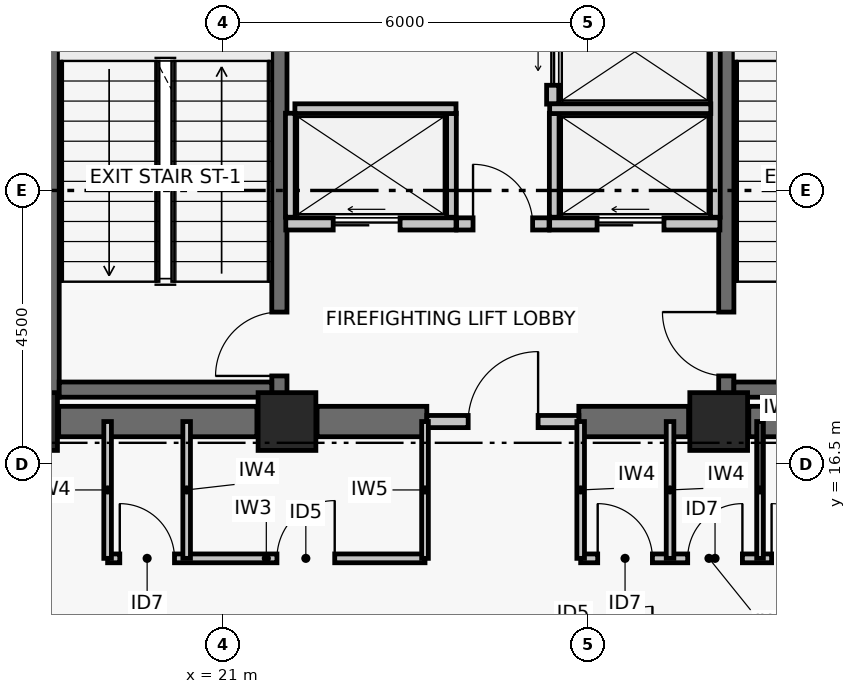
"""IFC4 building model, lengths in metres.
Left out: names, types, materials, properties, quantities, classifications, styles, units other than length and angle.
Written with IfcOpenShell. Run it as: python <this file> out.ifc"""

import sys

from ifc_helpers import new_model, si_unit, direction, frame, frame_2d, origin, origin_2d, place, context, subcontext, project, spatial, rectangle, extrude, element, fill, save


model = new_model("IFC4")
c1 = context("Model", 3, precision=1e-05, world=origin(), true_north=direction((0.0, 1.0)))
c2 = subcontext(c1, "Body", "Model", "MODEL_VIEW")
j1 = project(units=[si_unit("LENGTHUNIT", "METRE"), si_unit("PLANEANGLEUNIT", "RADIAN")], contexts=[c1])
p1 = place(None, origin())
s1 = spatial("IfcSite", under=j1, at=p1, CompositionType="ELEMENT")
p2 = place(p1, origin())
s2 = spatial("IfcBuilding", under=s1, at=p2, CompositionType="ELEMENT")
p3 = place(p2, frame((0.0, 0.0, 219.54)))
s3 = spatial("IfcBuildingStorey", under=s2, at=p3, CompositionType="ELEMENT", Elevation=219.54)
for number, where, z_axis, x_axis in (
    (1, (17.8, 17.2, 0.0), (0.0, 0.0, 1.0), (1.0, 0.0, 0.0)),
    (2, (22.05, 17.2, 0.0), (0.0, 0.0, 1.0), (1.0, 0.0, 0.0)),
    (3, (29.15, 17.2, 0.0), (0.0, 0.0, 1.0), (1.0, 0.0, 0.0)),
):
    element("IfcColumn", number, at=place(p3, frame(where, z_axis=z_axis, x_axis=x_axis)), inside=s3, PredefinedType="COLUMN", context=c2, shape_type="SweptSolid", body=[
        extrude(rectangle(XDim=0.95, YDim=0.95, at=origin_2d()), origin(), (0.0, 0.0, 1.0), 3.72),
    ])
p4 = place(p3, frame((18.295, 17.2, 0.0), z_axis=(0.0, 0.0, 1.0), x_axis=(1.0, 0.0, 0.0)))
e4 = element("IfcWall", 4, at=p4, inside=s3, PredefinedType="SHEAR", context=c2, shape_type="SweptSolid", body=[
    extrude(rectangle(XDim=3.26, YDim=0.5, at=frame_2d((1.63, 0.0))), origin(), (0.0, 0.0, 1.0), 3.5),
])
p5 = place(p3, frame((22.545, 17.2, 0.0), z_axis=(0.0, 0.0, 1.0), x_axis=(1.0, 0.0, 0.0)))
e5 = element("IfcWall", 5, at=p5, inside=s3, PredefinedType="SHEAR", context=c2, shape_type="SweptSolid", body=[
    extrude(rectangle(XDim=1.805, YDim=0.5, at=frame_2d((0.903, 0.0))), origin(), (0.0, 0.0, 1.0), 3.5),
])
p6 = place(p3, frame((26.85, 17.2, 0.0), z_axis=(0.0, 0.0, 1.0), x_axis=(1.0, 0.0, 0.0)))
e6 = element("IfcWall", 6, at=p6, inside=s3, PredefinedType="SHEAR", context=c2, shape_type="SweptSolid", body=[
    extrude(rectangle(XDim=1.805, YDim=0.5, at=frame_2d((0.902, 0.0))), origin(), (0.0, 0.0, 1.0), 3.5),
])
p7 = place(p3, frame((29.645, 17.2, 0.0), z_axis=(0.0, 0.0, 1.0), x_axis=(1.0, 0.0, 0.0)))
e7 = element("IfcWall", 7, at=p7, inside=s3, PredefinedType="SHEAR", context=c2, shape_type="SweptSolid", body=[
    extrude(rectangle(XDim=3.26, YDim=0.5, at=frame_2d((1.63, 0.0))), origin(), (0.0, 0.0, 1.0), 3.5),
])
p8 = place(p3, frame((18.179, 17.6, 0.0), z_axis=(0.0, 0.0, 1.0), x_axis=(0.0, 1.0, 0.0)))
e8 = element("IfcWall", 8, at=p8, inside=s3, PredefinedType="SHEAR", context=c2, shape_type="SweptSolid", body=[
    extrude(rectangle(XDim=8.8, YDim=0.25, at=frame_2d((4.4, 0.0))), origin(), (0.0, 0.0, 1.0), 3.5),
])
p9 = place(p3, frame((21.925, 17.6, 0.0), z_axis=(0.0, 0.0, 1.0), x_axis=(0.0, 1.0, 0.0)))
e9 = element("IfcWall", 9, at=p9, inside=s3, PredefinedType="SHEAR", context=c2, shape_type="SweptSolid", body=[
    extrude(rectangle(XDim=8.8, YDim=0.25, at=frame_2d((4.4, 0.0))), origin(), (0.0, 0.0, 1.0), 3.5),
])
p10 = place(p9, frame((0.35, 0.0, 0.0)))
e10 = element("IfcOpeningElement", 10, at=p10, cuts=e9, PredefinedType="OPENING", context=c2, shape_type="SweptSolid", body=[
    extrude(rectangle(XDim=1.05, YDim=2.08, at=frame_2d((0.525, 1.04))), frame((0.0, 0.135, 0.0), z_axis=(0.0, -1.0, 0.0), x_axis=(1.0, 0.0, 0.0)), (0.0, 0.0, 1.0), 0.27),
])
p11 = place(p3, frame((18.304, 17.725, 0.0), z_axis=(0.0, 0.0, 1.0), x_axis=(1.0, 0.0, 0.0)))
e11 = element("IfcWall", 11, at=p11, inside=s3, PredefinedType="SHEAR", context=c2, shape_type="SweptSolid", body=[
    extrude(rectangle(XDim=3.496, YDim=0.25, at=frame_2d((1.748, 0.0))), origin(), (0.0, 0.0, 1.0), 3.5),
])
p12 = place(p3, frame((29.275, 17.6, 0.0), z_axis=(0.0, 0.0, 1.0), x_axis=(0.0, 1.0, 0.0)))
e12 = element("IfcWall", 12, at=p12, inside=s3, PredefinedType="SHEAR", context=c2, shape_type="SweptSolid", body=[
    extrude(rectangle(XDim=8.8, YDim=0.25, at=frame_2d((4.4, 0.0))), origin(), (0.0, 0.0, 1.0), 3.5),
])
p13 = place(p12, frame((0.35, 0.0, 0.0)))
e13 = element("IfcOpeningElement", 13, at=p13, cuts=e12, PredefinedType="OPENING", context=c2, shape_type="SweptSolid", body=[
    extrude(rectangle(XDim=1.05, YDim=2.08, at=frame_2d((0.525, 1.04))), frame((0.0, 0.135, 0.0), z_axis=(0.0, -1.0, 0.0), x_axis=(1.0, 0.0, 0.0)), (0.0, 0.0, 1.0), 0.27),
])
p14 = place(p3, frame((29.4, 17.725, 0.0), z_axis=(0.0, 0.0, 1.0), x_axis=(1.0, 0.0, 0.0)))
e14 = element("IfcWall", 14, at=p14, inside=s3, PredefinedType="SHEAR", context=c2, shape_type="SweptSolid", body=[
    extrude(rectangle(XDim=3.496, YDim=0.25, at=frame_2d((1.748, 0.0))), origin(), (0.0, 0.0, 1.0), 3.5),
])
p15 = place(p3, frame((24.35, 17.2, 0.0), z_axis=(0.0, 0.0, 1.0), x_axis=(1.0, 0.0, 0.0)))
e15 = element("IfcWall", 15, at=p15, inside=s3, PredefinedType="PARTITIONING", context=c2, shape_type="SweptSolid", body=[
    extrude(rectangle(XDim=2.5, YDim=0.2, at=frame_2d((1.25, 0.0))), origin(), (0.0, 0.0, 1.0), 2.63),
])
p16 = place(p15, frame((0.68, 0.0, 0.0)))
e16 = element("IfcOpeningElement", 16, at=p16, cuts=e15, PredefinedType="OPENING", context=c2, shape_type="SweptSolid", body=[
    extrude(rectangle(XDim=1.15, YDim=2.08, at=frame_2d((0.575, 1.04))), frame((0.0, 0.11, 0.0), z_axis=(0.0, -1.0, 0.0), x_axis=(1.0, 0.0, 0.0)), (0.0, 0.0, 1.0), 0.22),
])
p17 = place(p3, frame((24.84, 20.45, 0.0), z_axis=(0.0, 0.0, 1.0), x_axis=(1.0, 0.0, 0.0)))
e17 = element("IfcWall", 17, at=p17, inside=s3, PredefinedType="PARTITIONING", context=c2, shape_type="SweptSolid", body=[
    extrude(rectangle(XDim=1.52, YDim=0.2, at=frame_2d((0.76, 0.0))), origin(), (0.0, 0.0, 1.0), 3.5),
])
p18 = place(p17, frame((0.27, 0.0, 0.0)))
e18 = element("IfcOpeningElement", 18, at=p18, cuts=e17, PredefinedType="OPENING", context=c2, shape_type="SweptSolid", body=[
    extrude(rectangle(XDim=0.98, YDim=2.06, at=frame_2d((0.49, 1.03))), frame((0.0, 0.11, 0.0), z_axis=(0.0, -1.0, 0.0), x_axis=(1.0, 0.0, 0.0)), (0.0, 0.0, 1.0), 0.22),
])
p19 = place(p3, frame((22.03, 20.45, 0.0), z_axis=(0.0, 0.0, 1.0), x_axis=(1.0, 0.0, 0.0)))
e19 = element("IfcWall", 19, at=p19, inside=s3, PredefinedType="PARTITIONING", context=c2, shape_type="SweptSolid", body=[
    extrude(rectangle(XDim=2.8, YDim=0.2, at=frame_2d((1.4, 0.0))), origin(), (0.0, 0.0, 1.0), 3.5),
])
p20 = place(p19, frame((0.78, 0.0, 0.0)))
e20 = element("IfcOpeningElement", 20, at=p20, cuts=e19, PredefinedType="OPENING", context=c2, shape_type="SweptSolid", body=[
    extrude(rectangle(XDim=1.1, YDim=2.08, at=frame_2d((0.55, 1.04))), frame((0.0, 0.11, 0.0), z_axis=(0.0, -1.0, 0.0), x_axis=(1.0, 0.0, 0.0)), (0.0, 0.0, 1.0), 0.22),
])
p21 = place(p3, frame((26.37, 20.45, 0.0), z_axis=(0.0, 0.0, 1.0), x_axis=(1.0, 0.0, 0.0)))
e21 = element("IfcWall", 21, at=p21, inside=s3, PredefinedType="PARTITIONING", context=c2, shape_type="SweptSolid", body=[
    extrude(rectangle(XDim=2.8, YDim=0.2, at=frame_2d((1.4, 0.0))), origin(), (0.0, 0.0, 1.0), 3.5),
])
p22 = place(p21, frame((0.78, 0.0, 0.0)))
e22 = element("IfcOpeningElement", 22, at=p22, cuts=e21, PredefinedType="OPENING", context=c2, shape_type="SweptSolid", body=[
    extrude(rectangle(XDim=1.1, YDim=2.08, at=frame_2d((0.55, 1.04))), frame((0.0, 0.11, 0.0), z_axis=(0.0, -1.0, 0.0), x_axis=(1.0, 0.0, 0.0)), (0.0, 0.0, 1.0), 0.22),
])
p23 = place(p3, frame((26.42, 22.42, 0.0), z_axis=(0.0, 0.0, 1.0), x_axis=(0.0, 1.0, 0.0)))
e23 = element("IfcWall", 23, at=p23, inside=s3, PredefinedType="PARTITIONING", context=c2, shape_type="SweptSolid", body=[
    extrude(rectangle(XDim=1.72, YDim=0.2, at=frame_2d((0.86, 0.0))), origin(), (0.0, 0.0, 1.0), 3.5),
])
p24 = place(p23, frame((0.31, 0.0, 0.0)))
e24 = element("IfcOpeningElement", 24, at=p24, cuts=e23, PredefinedType="OPENING", context=c2, shape_type="SweptSolid", body=[
    extrude(rectangle(XDim=1.1, YDim=2.08, at=frame_2d((0.55, 1.04))), frame((0.0, 0.11, 0.0), z_axis=(0.0, -1.0, 0.0), x_axis=(1.0, 0.0, 0.0)), (0.0, 0.0, 1.0), 0.22),
])
for number, where, z_axis, x_axis in (
    (25, (22.105, 20.56, 0.0), (0.0, 0.0, 1.0), (0.0, 1.0, 0.0)),
    (26, (24.755, 20.56, 0.0), (0.0, 0.0, 1.0), (0.0, 1.0, 0.0)),
):
    element("IfcWall", number, at=place(p3, frame(where, z_axis=z_axis, x_axis=x_axis)), inside=s3, PredefinedType="PARTITIONING", context=c2, shape_type="SweptSolid", body=[
        extrude(rectangle(XDim=1.71, YDim=0.16, at=frame_2d((0.855, 0.0))), origin(), (0.0, 0.0, 1.0), 3.5),
    ])
p25 = place(p3, frame((22.18, 22.345, 0.0), z_axis=(0.0, 0.0, 1.0), x_axis=(1.0, 0.0, 0.0)))
e27 = element("IfcWall", 27, at=p25, inside=s3, PredefinedType="PARTITIONING", context=c2, shape_type="SweptSolid", body=[
    extrude(rectangle(XDim=2.65, YDim=0.16, at=frame_2d((1.325, 0.0))), origin(), (0.0, 0.0, 1.0), 3.5),
])
p26 = place(p3, frame((29.095, 20.56, 0.0), z_axis=(0.0, 0.0, 1.0), x_axis=(0.0, 1.0, 0.0)))
e28 = element("IfcWall", 28, at=p26, inside=s3, PredefinedType="PARTITIONING", context=c2, shape_type="SweptSolid", body=[
    extrude(rectangle(XDim=3.58, YDim=0.16, at=frame_2d((1.79, 0.0))), origin(), (0.0, 0.0, 1.0), 3.5),
])
p27 = place(p3, frame((26.445, 20.56, 0.0), z_axis=(0.0, 0.0, 1.0), x_axis=(0.0, 1.0, 0.0)))
e29 = element("IfcWall", 29, at=p27, inside=s3, PredefinedType="PARTITIONING", context=c2, shape_type="SweptSolid", body=[
    extrude(rectangle(XDim=1.71, YDim=0.16, at=frame_2d((0.855, 0.0))), origin(), (0.0, 0.0, 1.0), 3.5),
])
p28 = place(p3, frame((26.37, 22.345, 0.0), z_axis=(0.0, 0.0, 1.0), x_axis=(1.0, 0.0, 0.0)))
e30 = element("IfcWall", 30, at=p28, inside=s3, PredefinedType="PARTITIONING", context=c2, shape_type="SweptSolid", body=[
    extrude(rectangle(XDim=2.65, YDim=0.16, at=frame_2d((1.325, 0.0))), origin(), (0.0, 0.0, 1.0), 3.5),
])
p29 = place(p3, frame((19.1, 14.95, 0.0), z_axis=(0.0, 0.0, 1.0), x_axis=(1.0, 0.0, 0.0)))
e31 = element("IfcWall", 31, at=p29, inside=s3, PredefinedType="PARTITIONING", context=c2, shape_type="SweptSolid", body=[
    extrude(rectangle(XDim=5.22, YDim=0.145, at=frame_2d((2.61, 0.0))), origin(), (0.0, 0.0, 1.0), 2.78),
])
p30 = place(p29, frame((0.2, 0.0, 0.0)))
e32 = element("IfcOpeningElement", 32, at=p30, cuts=e31, PredefinedType="OPENING", context=c2, shape_type="SweptSolid", body=[
    extrude(rectangle(XDim=0.9, YDim=2.02, at=frame_2d((0.45, 1.01))), frame((0.0, 0.083, 0.0), z_axis=(0.0, -1.0, 0.0), x_axis=(1.0, 0.0, 0.0)), (0.0, 0.0, 1.0), 0.165),
])
p31 = place(p29, frame((2.785, 0.0, 0.0)))
e33 = element("IfcOpeningElement", 33, at=p31, cuts=e31, PredefinedType="OPENING", context=c2, shape_type="SweptSolid", body=[
    extrude(rectangle(XDim=0.95, YDim=2.06, at=frame_2d((0.475, 1.03))), frame((0.0, 0.083, 0.0), z_axis=(0.0, -1.0, 0.0), x_axis=(1.0, 0.0, 0.0)), (0.0, 0.0, 1.0), 0.165),
])
p32 = place(p3, frame((26.88, 14.95, 0.0), z_axis=(0.0, 0.0, 1.0), x_axis=(1.0, 0.0, 0.0)))
e34 = element("IfcWall", 34, at=p32, inside=s3, PredefinedType="PARTITIONING", context=c2, shape_type="SweptSolid", body=[
    extrude(rectangle(XDim=4.22, YDim=0.145, at=frame_2d((2.11, 0.0))), origin(), (0.0, 0.0, 1.0), 2.98),
])
p33 = place(p32, frame((0.28, 0.0, 0.0)))
e35 = element("IfcOpeningElement", 35, at=p33, cuts=e34, PredefinedType="OPENING", context=c2, shape_type="SweptSolid", body=[
    extrude(rectangle(XDim=0.9, YDim=2.02, at=frame_2d((0.45, 1.01))), frame((0.0, 0.083, 0.0), z_axis=(0.0, -1.0, 0.0), x_axis=(1.0, 0.0, 0.0)), (0.0, 0.0, 1.0), 0.165),
])
p34 = place(p32, frame((1.76, 0.0, 0.0)))
e36 = element("IfcOpeningElement", 36, at=p34, cuts=e34, PredefinedType="OPENING", context=c2, shape_type="SweptSolid", body=[
    extrude(rectangle(XDim=0.9, YDim=2.02, at=frame_2d((0.45, 1.01))), frame((0.0, 0.083, 0.0), z_axis=(0.0, -1.0, 0.0), x_axis=(1.0, 0.0, 0.0)), (0.0, 0.0, 1.0), 0.165),
])
p35 = place(p32, frame((3.14, 0.0, 0.0)))
e37 = element("IfcOpeningElement", 37, at=p35, cuts=e34, PredefinedType="OPENING", context=c2, shape_type="SweptSolid", body=[
    extrude(rectangle(XDim=0.9, YDim=2.02, at=frame_2d((0.45, 1.01))), frame((0.0, 0.083, 0.0), z_axis=(0.0, -1.0, 0.0), x_axis=(1.0, 0.0, 0.0)), (0.0, 0.0, 1.0), 0.165),
])
for number, where, z_axis, x_axis in (
    (38, (19.1, 14.95, 0.0), (0.0, 0.0, 1.0), (0.0, 1.0, 0.0)),
    (39, (20.4, 14.95, 0.0), (0.0, 0.0, 1.0), (0.0, 1.0, 0.0)),
):
    element("IfcWall", number, at=place(p3, frame(where, z_axis=z_axis, x_axis=x_axis)), inside=s3, PredefinedType="PARTITIONING", context=c2, shape_type="SweptSolid", body=[
        extrude(rectangle(XDim=2.25, YDim=0.125, at=frame_2d((1.125, 0.0))), origin(), (0.0, 0.0, 1.0), 2.63),
    ])
p36 = place(p3, frame((24.32, 14.95, 0.0), z_axis=(0.0, 0.0, 1.0), x_axis=(0.0, 1.0, 0.0)))
e40 = element("IfcWall", 40, at=p36, inside=s3, PredefinedType="PARTITIONING", context=c2, shape_type="SweptSolid", body=[
    extrude(rectangle(XDim=2.25, YDim=0.11, at=frame_2d((1.125, 0.0))), origin(), (0.0, 0.0, 1.0), 2.63),
])
for number, where, z_axis, x_axis in (
    (41, (26.88, 14.95, 0.0), (0.0, 0.0, 1.0), (0.0, 1.0, 0.0)),
    (42, (28.35, 14.95, 0.0), (0.0, 0.0, 1.0), (0.0, 1.0, 0.0)),
):
    element("IfcWall", number, at=place(p3, frame(where, z_axis=z_axis, x_axis=x_axis)), inside=s3, PredefinedType="PARTITIONING", context=c2, shape_type="SweptSolid", body=[
        extrude(rectangle(XDim=2.25, YDim=0.125, at=frame_2d((1.125, 0.0))), origin(), (0.0, 0.0, 1.0), 2.63),
    ])
p37 = place(p3, frame((29.83, 14.95, 0.0), z_axis=(0.0, 0.0, 1.0), x_axis=(0.0, 1.0, 0.0)))
e43 = element("IfcWall", 43, at=p37, inside=s3, PredefinedType="PARTITIONING", context=c2, shape_type="SweptSolid", body=[
    extrude(rectangle(XDim=2.25, YDim=0.11, at=frame_2d((1.125, 0.0))), origin(), (0.0, 0.0, 1.0), 2.63),
])
p38 = place(p3, frame((29.709, 13.222, 0.0), z_axis=(0.0, 0.0, 1.0), x_axis=(0.854635840942, 0.519227868451, 0.0)))
e44 = element("IfcWall", 44, at=p38, inside=s3, PredefinedType="PARTITIONING", context=c2, shape_type="SweptSolid", body=[
    extrude(rectangle(XDim=1.735, YDim=0.145, at=frame_2d((0.867, 0.0))), origin(), (0.0, 0.0, 1.0), 3.5),
])
p39 = place(p10, origin())
e45 = element("IfcDoor", 45, at=p39, inside=s3, OperationType="SINGLE_SWING_LEFT", PredefinedType="DOOR", context=c2, shape_type="SweptSolid", body=[
    extrude(rectangle(XDim=1.05, YDim=2.08, at=frame_2d((0.525, 1.04))), frame((0.0, 0.025, 0.0), z_axis=(0.0, -1.0, 0.0), x_axis=(1.0, 0.0, 0.0)), (0.0, 0.0, 1.0), 0.05),
])
fill(e10, e45)
p40 = place(p13, origin())
e46 = element("IfcDoor", 46, at=p40, inside=s3, OperationType="SINGLE_SWING_RIGHT", PredefinedType="DOOR", context=c2, shape_type="SweptSolid", body=[
    extrude(rectangle(XDim=1.05, YDim=2.08, at=frame_2d((0.525, 1.04))), frame((0.0, 0.025, 0.0), z_axis=(0.0, -1.0, 0.0), x_axis=(1.0, 0.0, 0.0)), (0.0, 0.0, 1.0), 0.05),
])
fill(e13, e46)
p41 = place(p16, origin())
e47 = element("IfcDoor", 47, at=p41, inside=s3, OperationType="SINGLE_SWING_RIGHT", PredefinedType="DOOR", context=c2, shape_type="SweptSolid", body=[
    extrude(rectangle(XDim=1.15, YDim=2.08, at=frame_2d((0.575, 1.04))), frame((0.0, 0.025, 0.0), z_axis=(0.0, -1.0, 0.0), x_axis=(1.0, 0.0, 0.0)), (0.0, 0.0, 1.0), 0.05),
])
fill(e16, e47)
p42 = place(p18, origin())
e48 = element("IfcDoor", 48, at=p42, inside=s3, OperationType="SINGLE_SWING_LEFT", PredefinedType="DOOR", context=c2, shape_type="SweptSolid", body=[
    extrude(rectangle(XDim=0.98, YDim=2.06, at=frame_2d((0.49, 1.03))), frame((0.0, 0.025, 0.0), z_axis=(0.0, -1.0, 0.0), x_axis=(1.0, 0.0, 0.0)), (0.0, 0.0, 1.0), 0.05),
])
fill(e18, e48)
p43 = place(p20, origin())
e49 = element("IfcDoor", 49, at=p43, inside=s3, OperationType="DOUBLE_DOOR_SLIDING", PredefinedType="DOOR", context=c2, shape_type="SweptSolid", body=[
    extrude(rectangle(XDim=1.1, YDim=2.08, at=frame_2d((0.55, 1.04))), frame((0.0, 0.025, 0.0), z_axis=(0.0, -1.0, 0.0), x_axis=(1.0, 0.0, 0.0)), (0.0, 0.0, 1.0), 0.05),
])
fill(e20, e49)
p44 = place(p22, origin())
e50 = element("IfcDoor", 50, at=p44, inside=s3, OperationType="DOUBLE_DOOR_SLIDING", PredefinedType="DOOR", context=c2, shape_type="SweptSolid", body=[
    extrude(rectangle(XDim=1.1, YDim=2.08, at=frame_2d((0.55, 1.04))), frame((0.0, 0.025, 0.0), z_axis=(0.0, -1.0, 0.0), x_axis=(1.0, 0.0, 0.0)), (0.0, 0.0, 1.0), 0.05),
])
fill(e22, e50)
p45 = place(p24, origin())
e51 = element("IfcDoor", 51, at=p45, inside=s3, OperationType="DOUBLE_DOOR_SLIDING", PredefinedType="DOOR", context=c2, shape_type="SweptSolid", body=[
    extrude(rectangle(XDim=1.1, YDim=2.08, at=frame_2d((0.55, 1.04))), frame((0.0, 0.025, 0.0), z_axis=(0.0, -1.0, 0.0), x_axis=(1.0, 0.0, 0.0)), (0.0, 0.0, 1.0), 0.05),
])
fill(e24, e51)
p46 = place(p30, origin())
e52 = element("IfcDoor", 52, at=p46, inside=s3, OperationType="SINGLE_SWING_LEFT", PredefinedType="DOOR", context=c2, shape_type="SweptSolid", body=[
    extrude(rectangle(XDim=0.9, YDim=2.02, at=frame_2d((0.45, 1.01))), frame((0.0, 0.025, 0.0), z_axis=(0.0, -1.0, 0.0), x_axis=(1.0, 0.0, 0.0)), (0.0, 0.0, 1.0), 0.05),
])
fill(e32, e52)
p47 = place(p31, origin())
e53 = element("IfcDoor", 53, at=p47, inside=s3, OperationType="SINGLE_SWING_RIGHT", PredefinedType="DOOR", context=c2, shape_type="SweptSolid", body=[
    extrude(rectangle(XDim=0.95, YDim=2.06, at=frame_2d((0.475, 1.03))), frame((0.0, 0.025, 0.0), z_axis=(0.0, -1.0, 0.0), x_axis=(1.0, 0.0, 0.0)), (0.0, 0.0, 1.0), 0.05),
])
fill(e33, e53)
p48 = place(p33, origin())
e54 = element("IfcDoor", 54, at=p48, inside=s3, OperationType="SINGLE_SWING_LEFT", PredefinedType="DOOR", context=c2, shape_type="SweptSolid", body=[
    extrude(rectangle(XDim=0.9, YDim=2.02, at=frame_2d((0.45, 1.01))), frame((0.0, 0.025, 0.0), z_axis=(0.0, -1.0, 0.0), x_axis=(1.0, 0.0, 0.0)), (0.0, 0.0, 1.0), 0.05),
])
fill(e35, e54)
p49 = place(p34, origin())
e55 = element("IfcDoor", 55, at=p49, inside=s3, OperationType="SINGLE_SWING_RIGHT", PredefinedType="DOOR", context=c2, shape_type="SweptSolid", body=[
    extrude(rectangle(XDim=0.9, YDim=2.02, at=frame_2d((0.45, 1.01))), frame((0.0, 0.025, 0.0), z_axis=(0.0, -1.0, 0.0), x_axis=(1.0, 0.0, 0.0)), (0.0, 0.0, 1.0), 0.05),
])
fill(e36, e55)
p50 = place(p35, origin())
e56 = element("IfcDoor", 56, at=p50, inside=s3, OperationType="SINGLE_SWING_LEFT", PredefinedType="DOOR", context=c2, shape_type="SweptSolid", body=[
    extrude(rectangle(XDim=0.9, YDim=2.02, at=frame_2d((0.45, 1.01))), frame((0.0, 0.025, 0.0), z_axis=(0.0, -1.0, 0.0), x_axis=(1.0, 0.0, 0.0)), (0.0, 0.0, 1.0), 0.05),
])
fill(e37, e56)
save(model, sys.argv[1])
